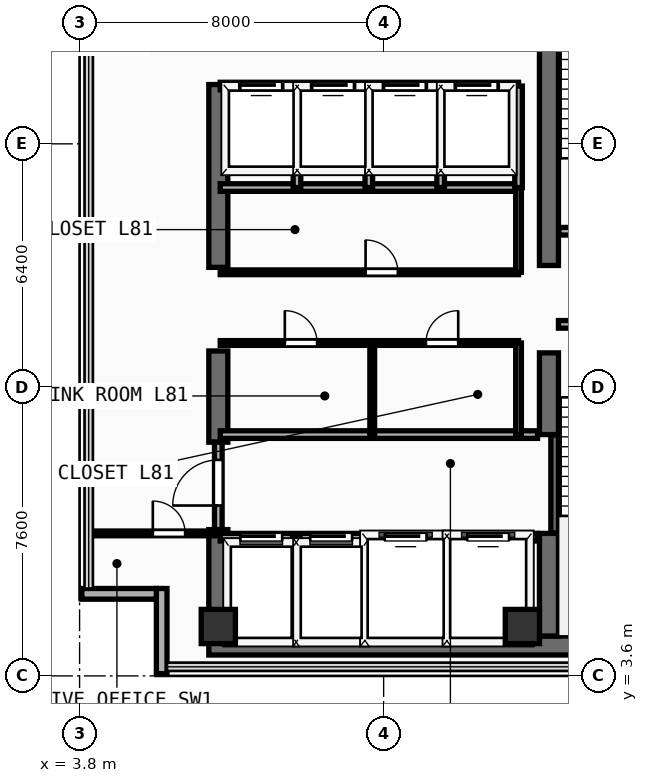
"""IFC4 building model, lengths in metres.
Left out: names, types, materials, properties, quantities, classifications, styles, units other than length and angle.
Written with IfcOpenShell. Run it as: python <this file> out.ifc"""

import sys

from ifc_helpers import new_model, si_unit, direction, frame, frame_2d, origin, origin_2d, place, context, subcontext, project, spatial, rectangle, extrude, element, fill, save


model = new_model("IFC4")
c1 = context("Model", 3, precision=1e-05, world=origin(), true_north=direction((0.0, 1.0)))
c2 = subcontext(c1, "Body", "Model", "MODEL_VIEW")
j1 = project(units=[si_unit("LENGTHUNIT", "METRE"), si_unit("PLANEANGLEUNIT", "RADIAN")], contexts=[c1])
p1 = place(None, origin())
s1 = spatial("IfcSite", under=j1, at=p1, CompositionType="ELEMENT")
p2 = place(p1, origin())
s2 = spatial("IfcBuilding", under=s1, at=p2, CompositionType="ELEMENT")
p3 = place(p2, frame((0.0, 0.0, 316.0)))
s3 = spatial("IfcBuildingStorey", under=s2, at=p3, CompositionType="ELEMENT", Elevation=316.0)
p4 = place(p3, frame((7.2, 4.4, 0.0), z_axis=(0.0, 0.0, 1.0), x_axis=(1.0, 0.0, 0.0)))
e1 = element("IfcWall", 1, at=p4, inside=s3, PredefinedType="SHEAR", context=c2, shape_type="SweptSolid", body=[
    extrude(rectangle(XDim=13.85, YDim=0.5, at=frame_2d((6.925, 0.0))), origin(), (0.0, 0.0, 1.0), 3.56),
])
p5 = place(p3, frame((7.45, 4.65, 0.0), z_axis=(0.0, 0.0, 1.0), x_axis=(0.0, 1.0, 0.0)))
e2 = element("IfcWall", 2, at=p5, inside=s3, PredefinedType="SHEAR", context=c2, shape_type="SweptSolid", body=[
    extrude(rectangle(XDim=2.8, YDim=0.5, at=frame_2d((1.4, 0.0))), origin(), (0.0, 0.0, 1.0), 3.56),
])
p6 = place(p3, frame((7.45, 9.75, 0.0), z_axis=(0.0, 0.0, 1.0), x_axis=(0.0, 1.0, 0.0)))
e3 = element("IfcWall", 3, at=p6, inside=s3, PredefinedType="SHEAR", context=c2, shape_type="SweptSolid", body=[
    extrude(rectangle(XDim=2.4, YDim=0.5, at=frame_2d((1.2, 0.0))), origin(), (0.0, 0.0, 1.0), 3.56),
])
p7 = place(p3, frame((7.45, 14.35, 0.0), z_axis=(0.0, 0.0, 1.0), x_axis=(0.0, 1.0, 0.0)))
e4 = element("IfcWall", 4, at=p7, inside=s3, PredefinedType="SHEAR", context=c2, shape_type="SweptSolid", body=[
    extrude(rectangle(XDim=4.81, YDim=0.5, at=frame_2d((2.405, 0.0))), origin(), (0.0, 0.0, 1.0), 3.56),
])
p8 = place(p3, frame((16.15, 4.65, 0.0), z_axis=(0.0, 0.0, 1.0), x_axis=(0.0, 1.0, 0.0)))
e5 = element("IfcWall", 5, at=p8, inside=s3, PredefinedType="SHEAR", context=c2, shape_type="SweptSolid", body=[
    extrude(rectangle(XDim=2.7, YDim=0.5, at=frame_2d((1.35, 0.0))), origin(), (0.0, 0.0, 1.0), 3.56),
])
p9 = place(p3, frame((16.15, 9.95, 0.0), z_axis=(0.0, 0.0, 1.0), x_axis=(0.0, 1.0, 0.0)))
e6 = element("IfcWall", 6, at=p9, inside=s3, PredefinedType="SHEAR", context=c2, shape_type="SweptSolid", body=[
    extrude(rectangle(XDim=2.15, YDim=0.5, at=frame_2d((1.075, 0.0))), origin(), (0.0, 0.0, 1.0), 3.56),
])
p10 = place(p3, frame((16.15, 14.4, 0.0), z_axis=(0.0, 0.0, 1.0), x_axis=(0.0, 1.0, 0.0)))
e7 = element("IfcWall", 7, at=p10, inside=s3, PredefinedType="SHEAR", context=c2, shape_type="SweptSolid", body=[
    extrude(rectangle(XDim=9.1, YDim=0.5, at=frame_2d((4.55, 0.0))), origin(), (0.0, 0.0, 1.0), 3.56),
])
for number, where, z_axis, x_axis in (
    (8, (7.45, 4.9, 0.0), (0.0, 0.0, 1.0), (1.0, 0.0, 0.0)),
    (9, (15.45, 4.9, 0.0), (0.0, 0.0, 1.0), (1.0, 0.0, 0.0)),
):
    element("IfcColumn", number, at=place(p3, frame(where, z_axis=z_axis, x_axis=x_axis)), inside=s3, PredefinedType="COLUMN", context=c2, shape_type="SweptSolid", body=[
        extrude(rectangle(XDim=0.9, YDim=0.9, at=origin_2d()), origin(), (0.0, 0.0, 1.0), 3.56),
    ])
p11 = place(p3, frame((5.96, 3.66, 0.0), z_axis=(0.0, 0.0, 1.0), x_axis=(0.0, 1.0, 0.0)))
e10 = element("IfcWall", 10, at=p11, inside=s3, PredefinedType="SOLIDWALL", context=c2, shape_type="SweptSolid", body=[
    extrude(rectangle(XDim=2.24, YDim=0.28, at=frame_2d((1.12, 0.0))), origin(), (0.0, 0.0, 1.0), 3.56),
])
p12 = place(p3, frame((3.86, 5.76, 0.0), z_axis=(0.0, 0.0, 1.0), x_axis=(1.0, 0.0, 0.0)))
e11 = element("IfcWall", 11, at=p12, inside=s3, PredefinedType="SOLIDWALL", context=c2, shape_type="SweptSolid", body=[
    extrude(rectangle(XDim=1.96, YDim=0.28, at=frame_2d((0.98, 0.0))), origin(), (0.0, 0.0, 1.0), 3.56),
])
p13 = place(p3, frame((16.3, 7.36, 0.0), z_axis=(0.0, 0.0, 1.0), x_axis=(0.0, 1.0, 0.0)))
e12 = element("IfcWall", 12, at=p13, inside=s3, PredefinedType="SHEAR", context=c2, shape_type="SweptSolid", body=[
    extrude(rectangle(XDim=2.58, YDim=0.2, at=frame_2d((1.29, 0.0))), origin(), (0.0, 0.0, 1.0), 3.56),
])
p14 = place(p3, frame((16.4, 12.85, 0.0), z_axis=(0.0, 0.0, 1.0), x_axis=(1.0, 0.0, 0.0)))
e13 = element("IfcWall", 13, at=p14, inside=s3, PredefinedType="PARTITIONING", context=c2, shape_type="SweptSolid", body=[
    extrude(rectangle(XDim=3.96, YDim=0.2, at=frame_2d((1.98, 0.0))), origin(), (0.0, 0.0, 1.0), 3.56),
])
p15 = place(p14, frame((1.304, 0.0, 0.0)))
e14 = element("IfcOpeningElement", 14, at=p15, cuts=e13, PredefinedType="OPENING", context=c2, shape_type="SweptSolid", body=[
    extrude(rectangle(XDim=1.1, YDim=2.2, at=frame_2d((0.55, 1.1))), frame((0.0, 0.11, 0.0), z_axis=(0.0, -1.0, 0.0), x_axis=(1.0, 0.0, 0.0)), (0.0, 0.0, 1.0), 0.22),
])
p16 = place(p3, frame((16.41, 15.3, 0.0), z_axis=(0.0, 0.0, 1.0), x_axis=(1.0, 0.0, 0.0)))
e15 = element("IfcWall", 15, at=p16, inside=s3, PredefinedType="PARTITIONING", context=c2, shape_type="SweptSolid", body=[
    extrude(rectangle(XDim=3.95, YDim=0.2, at=frame_2d((1.975, 0.0))), origin(), (0.0, 0.0, 1.0), 3.56),
])
p17 = place(p16, frame((1.294, 0.0, 0.0)))
e16 = element("IfcOpeningElement", 16, at=p17, cuts=e15, PredefinedType="OPENING", context=c2, shape_type="SweptSolid", body=[
    extrude(rectangle(XDim=1.1, YDim=2.2, at=frame_2d((0.55, 1.1))), frame((0.0, 0.11, 0.0), z_axis=(0.0, -1.0, 0.0), x_axis=(1.0, 0.0, 0.0)), (0.0, 0.0, 1.0), 0.22),
])
p18 = place(p3, frame((7.5, 7.25, 0.0), z_axis=(0.0, 0.0, 1.0), x_axis=(1.0, 0.0, 0.0)))
e17 = element("IfcWall", 17, at=p18, inside=s3, PredefinedType="PARTITIONING", context=c2, shape_type="SweptSolid", body=[
    extrude(rectangle(XDim=8.35, YDim=0.2, at=frame_2d((4.175, 0.0))), origin(), (0.0, 0.0, 1.0), 3.56),
])
p19 = place(p18, frame((0.53, 0.0, 0.0)))
e18 = element("IfcOpeningElement", 18, at=p19, cuts=e17, PredefinedType="OPENING", context=c2, shape_type="SweptSolid", body=[
    extrude(rectangle(XDim=1.1, YDim=2.2, at=frame_2d((0.55, 1.1))), frame((0.0, 0.11, 0.0), z_axis=(0.0, -1.0, 0.0), x_axis=(1.0, 0.0, 0.0)), (0.0, 0.0, 1.0), 0.22),
])
p20 = place(p18, frame((2.37, 0.0, 0.0)))
e19 = element("IfcOpeningElement", 19, at=p20, cuts=e17, PredefinedType="OPENING", context=c2, shape_type="SweptSolid", body=[
    extrude(rectangle(XDim=1.1, YDim=2.2, at=frame_2d((0.55, 1.1))), frame((0.0, 0.11, 0.0), z_axis=(0.0, -1.0, 0.0), x_axis=(1.0, 0.0, 0.0)), (0.0, 0.0, 1.0), 0.22),
])
p21 = place(p18, frame((4.33, 0.0, 0.0)))
e20 = element("IfcOpeningElement", 20, at=p21, cuts=e17, PredefinedType="OPENING", context=c2, shape_type="SweptSolid", body=[
    extrude(rectangle(XDim=1.1, YDim=2.2, at=frame_2d((0.55, 1.1))), frame((0.0, 0.11, 0.0), z_axis=(0.0, -1.0, 0.0), x_axis=(1.0, 0.0, 0.0)), (0.0, 0.0, 1.0), 0.22),
])
p22 = place(p18, frame((6.5, 0.0, 0.0)))
e21 = element("IfcOpeningElement", 21, at=p22, cuts=e17, PredefinedType="OPENING", context=c2, shape_type="SweptSolid", body=[
    extrude(rectangle(XDim=1.1, YDim=2.2, at=frame_2d((0.55, 1.1))), frame((0.0, 0.11, 0.0), z_axis=(0.0, -1.0, 0.0), x_axis=(1.0, 0.0, 0.0)), (0.0, 0.0, 1.0), 0.22),
])
p23 = place(p3, frame((7.5, 9.95, 0.0), z_axis=(0.0, 0.0, 1.0), x_axis=(1.0, 0.0, 0.0)))
e22 = element("IfcWall", 22, at=p23, inside=s3, PredefinedType="PARTITIONING", context=c2, shape_type="SweptSolid", body=[
    extrude(rectangle(XDim=8.35, YDim=0.2, at=frame_2d((4.175, 0.0))), origin(), (0.0, 0.0, 1.0), 3.56),
])
for number, where, z_axis, x_axis in (
    (23, (9.5, 4.45, 0.0), (0.0, 0.0, 1.0), (0.0, 1.0, 0.0)),
    (24, (11.36, 4.45, 0.0), (0.0, 0.0, 1.0), (0.0, 1.0, 0.0)),
    (25, (13.46, 4.45, 0.0), (0.0, 0.0, 1.0), (0.0, 1.0, 0.0)),
):
    element("IfcWall", number, at=place(p3, frame(where, z_axis=z_axis, x_axis=x_axis)), inside=s3, PredefinedType="PARTITIONING", context=c2, shape_type="SweptSolid", body=[
        extrude(rectangle(XDim=2.8, YDim=0.2, at=frame_2d((1.4, 0.0))), origin(), (0.0, 0.0, 1.0), 3.56),
    ])
p24 = place(p3, frame((7.45, 7.45, 0.0), z_axis=(0.0, 0.0, 1.0), x_axis=(0.0, 1.0, 0.0)))
e26 = element("IfcWall", 26, at=p24, inside=s3, PredefinedType="PARTITIONING", context=c2, shape_type="SweptSolid", body=[
    extrude(rectangle(XDim=2.3, YDim=0.2, at=frame_2d((1.15, 0.0))), origin(), (0.0, 0.0, 1.0), 2.54),
])
p25 = place(p24, frame((0.633, 0.0, 0.0)))
e27 = element("IfcOpeningElement", 27, at=p25, cuts=e26, PredefinedType="OPENING", context=c2, shape_type="SweptSolid", body=[
    extrude(rectangle(XDim=1.2, YDim=2.25, at=frame_2d((0.6, 1.125))), frame((0.0, 0.11, 0.0), z_axis=(0.0, -1.0, 0.0), x_axis=(1.0, 0.0, 0.0)), (0.0, 0.0, 1.0), 0.22),
])
p26 = place(p3, frame((7.5, 16.45, 0.0), z_axis=(0.0, 0.0, 1.0), x_axis=(1.0, 0.0, 0.0)))
e28 = element("IfcWall", 28, at=p26, inside=s3, PredefinedType="PARTITIONING", context=c2, shape_type="SweptSolid", body=[
    extrude(rectangle(XDim=7.85, YDim=0.2, at=frame_2d((3.925, 0.0))), origin(), (0.0, 0.0, 1.0), 3.56),
])
p27 = place(p3, frame((7.5, 12.36, 0.0), z_axis=(0.0, 0.0, 1.0), x_axis=(1.0, 0.0, 0.0)))
e29 = element("IfcWall", 29, at=p27, inside=s3, PredefinedType="PARTITIONING", context=c2, shape_type="SweptSolid", body=[
    extrude(rectangle(XDim=7.85, YDim=0.125, at=frame_2d((3.925, 0.0))), origin(), (0.0, 0.0, 1.0), 3.56),
])
p28 = place(p27, frame((1.7, 0.0, 0.0)))
e30 = element("IfcOpeningElement", 30, at=p28, cuts=e29, PredefinedType="OPENING", context=c2, shape_type="SweptSolid", body=[
    extrude(rectangle(XDim=0.85, YDim=2.15, at=frame_2d((0.425, 1.075))), frame((0.0, 0.073, 0.0), z_axis=(0.0, -1.0, 0.0), x_axis=(1.0, 0.0, 0.0)), (0.0, 0.0, 1.0), 0.145),
])
p29 = place(p27, frame((5.413, 0.0, 0.0)))
e31 = element("IfcOpeningElement", 31, at=p29, cuts=e29, PredefinedType="OPENING", context=c2, shape_type="SweptSolid", body=[
    extrude(rectangle(XDim=0.85, YDim=2.15, at=frame_2d((0.425, 1.075))), frame((0.0, 0.073, 0.0), z_axis=(0.0, -1.0, 0.0), x_axis=(1.0, 0.0, 0.0)), (0.0, 0.0, 1.0), 0.145),
])
p30 = place(p3, frame((7.5, 14.22, 0.0), z_axis=(0.0, 0.0, 1.0), x_axis=(1.0, 0.0, 0.0)))
e32 = element("IfcWall", 32, at=p30, inside=s3, PredefinedType="PARTITIONING", context=c2, shape_type="SweptSolid", body=[
    extrude(rectangle(XDim=7.85, YDim=0.125, at=frame_2d((3.925, 0.0))), origin(), (0.0, 0.0, 1.0), 3.56),
])
p31 = place(p30, frame((3.825, 0.0, 0.0)))
e33 = element("IfcOpeningElement", 33, at=p31, cuts=e32, PredefinedType="OPENING", context=c2, shape_type="SweptSolid", body=[
    extrude(rectangle(XDim=0.85, YDim=2.15, at=frame_2d((0.425, 1.075))), frame((0.0, 0.073, 0.0), z_axis=(0.0, -1.0, 0.0), x_axis=(1.0, 0.0, 0.0)), (0.0, 0.0, 1.0), 0.145),
])
p32 = place(p3, frame((15.35, 9.95, 0.0), z_axis=(0.0, 0.0, 1.0), x_axis=(0.0, 1.0, 0.0)))
e34 = element("IfcWall", 34, at=p32, inside=s3, PredefinedType="PARTITIONING", context=c2, shape_type="SweptSolid", body=[
    extrude(rectangle(XDim=2.41, YDim=0.15, at=frame_2d((1.205, 0.0))), origin(), (0.0, 0.0, 1.0), 3.56),
])
p33 = place(p3, frame((15.35, 14.22, 0.0), z_axis=(0.0, 0.0, 1.0), x_axis=(0.0, 1.0, 0.0)))
e35 = element("IfcWall", 35, at=p33, inside=s3, PredefinedType="PARTITIONING", context=c2, shape_type="SweptSolid", body=[
    extrude(rectangle(XDim=2.23, YDim=0.15, at=frame_2d((1.115, 0.0))), origin(), (0.0, 0.0, 1.0), 3.56),
])
p34 = place(p3, frame((11.5, 9.95, 0.0), z_axis=(0.0, 0.0, 1.0), x_axis=(0.0, 1.0, 0.0)))
e36 = element("IfcWall", 36, at=p34, inside=s3, PredefinedType="PARTITIONING", context=c2, shape_type="SweptSolid", body=[
    extrude(rectangle(XDim=2.41, YDim=0.125, at=frame_2d((1.205, 0.0))), origin(), (0.0, 0.0, 1.0), 3.56),
])
p35 = place(p3, frame((7.5, 19.12, 0.0), z_axis=(0.0, 0.0, 1.0), x_axis=(1.0, 0.0, 0.0)))
e37 = element("IfcWall", 37, at=p35, inside=s3, PredefinedType="PARTITIONING", context=c2, shape_type="SweptSolid", body=[
    extrude(rectangle(XDim=7.85, YDim=0.2, at=frame_2d((3.925, 0.0))), origin(), (0.0, 0.0, 1.0), 3.56),
])
p36 = place(p35, frame((0.53, 0.0, 0.0)))
e38 = element("IfcOpeningElement", 38, at=p36, cuts=e37, PredefinedType="OPENING", context=c2, shape_type="SweptSolid", body=[
    extrude(rectangle(XDim=1.1, YDim=2.2, at=frame_2d((0.55, 1.1))), frame((0.0, 0.11, 0.0), z_axis=(0.0, -1.0, 0.0), x_axis=(1.0, 0.0, 0.0)), (0.0, 0.0, 1.0), 0.22),
])
p37 = place(p35, frame((2.42, 0.0, 0.0)))
e39 = element("IfcOpeningElement", 39, at=p37, cuts=e37, PredefinedType="OPENING", context=c2, shape_type="SweptSolid", body=[
    extrude(rectangle(XDim=1.1, YDim=2.2, at=frame_2d((0.55, 1.1))), frame((0.0, 0.11, 0.0), z_axis=(0.0, -1.0, 0.0), x_axis=(1.0, 0.0, 0.0)), (0.0, 0.0, 1.0), 0.22),
])
p38 = place(p35, frame((4.31, 0.0, 0.0)))
e40 = element("IfcOpeningElement", 40, at=p38, cuts=e37, PredefinedType="OPENING", context=c2, shape_type="SweptSolid", body=[
    extrude(rectangle(XDim=1.1, YDim=2.2, at=frame_2d((0.55, 1.1))), frame((0.0, 0.11, 0.0), z_axis=(0.0, -1.0, 0.0), x_axis=(1.0, 0.0, 0.0)), (0.0, 0.0, 1.0), 0.22),
])
p39 = place(p35, frame((6.2, 0.0, 0.0)))
e41 = element("IfcOpeningElement", 41, at=p39, cuts=e37, PredefinedType="OPENING", context=c2, shape_type="SweptSolid", body=[
    extrude(rectangle(XDim=1.1, YDim=2.2, at=frame_2d((0.55, 1.1))), frame((0.0, 0.11, 0.0), z_axis=(0.0, -1.0, 0.0), x_axis=(1.0, 0.0, 0.0)), (0.0, 0.0, 1.0), 0.22),
])
for number, where, z_axis, x_axis in (
    (42, (15.35, 16.45, 0.0), (0.0, 0.0, 1.0), (0.0, 1.0, 0.0)),
    (43, (9.52, 16.45, 0.0), (0.0, 0.0, 1.0), (0.0, 1.0, 0.0)),
    (44, (11.41, 16.45, 0.0), (0.0, 0.0, 1.0), (0.0, 1.0, 0.0)),
    (45, (13.3, 16.45, 0.0), (0.0, 0.0, 1.0), (0.0, 1.0, 0.0)),
):
    element("IfcWall", number, at=place(p3, frame(where, z_axis=z_axis, x_axis=x_axis)), inside=s3, PredefinedType="PARTITIONING", context=c2, shape_type="SweptSolid", body=[
        extrude(rectangle(XDim=2.67, YDim=0.2, at=frame_2d((1.335, 0.0))), origin(), (0.0, 0.0, 1.0), 3.56),
    ])
p40 = place(p3, frame((4.04, 7.35, 0.0), z_axis=(0.0, 0.0, 1.0), x_axis=(1.0, 0.0, 0.0)))
e46 = element("IfcWall", 46, at=p40, inside=s3, PredefinedType="PARTITIONING", context=c2, shape_type="SweptSolid", body=[
    extrude(rectangle(XDim=3.36, YDim=0.125, at=frame_2d((1.68, 0.0))), origin(), (0.0, 0.0, 1.0), 3.56),
])
p41 = place(p40, frame((1.687, 0.0, 0.0)))
e47 = element("IfcOpeningElement", 47, at=p41, cuts=e46, PredefinedType="OPENING", context=c2, shape_type="SweptSolid", body=[
    extrude(rectangle(XDim=0.85, YDim=2.15, at=frame_2d((0.425, 1.075))), frame((0.0, 0.073, 0.0), z_axis=(0.0, -1.0, 0.0), x_axis=(1.0, 0.0, 0.0)), (0.0, 0.0, 1.0), 0.145),
])
p42 = place(p19, origin())
e48 = element("IfcDoor", 48, at=p42, inside=s3, OperationType="SLIDING_TO_LEFT", PredefinedType="DOOR", context=c2, shape_type="SweptSolid", body=[
    extrude(rectangle(XDim=1.1, YDim=2.2, at=frame_2d((0.55, 1.1))), frame((0.0, 0.025, 0.0), z_axis=(0.0, -1.0, 0.0), x_axis=(1.0, 0.0, 0.0)), (0.0, 0.0, 1.0), 0.05),
])
fill(e18, e48)
p43 = place(p20, origin())
e49 = element("IfcDoor", 49, at=p43, inside=s3, OperationType="SLIDING_TO_LEFT", PredefinedType="DOOR", context=c2, shape_type="SweptSolid", body=[
    extrude(rectangle(XDim=1.1, YDim=2.2, at=frame_2d((0.55, 1.1))), frame((0.0, 0.025, 0.0), z_axis=(0.0, -1.0, 0.0), x_axis=(1.0, 0.0, 0.0)), (0.0, 0.0, 1.0), 0.05),
])
fill(e19, e49)
p44 = place(p21, origin())
e50 = element("IfcDoor", 50, at=p44, inside=s3, OperationType="SLIDING_TO_LEFT", PredefinedType="DOOR", context=c2, shape_type="SweptSolid", body=[
    extrude(rectangle(XDim=1.1, YDim=2.2, at=frame_2d((0.55, 1.1))), frame((0.0, 0.025, 0.0), z_axis=(0.0, -1.0, 0.0), x_axis=(1.0, 0.0, 0.0)), (0.0, 0.0, 1.0), 0.05),
])
fill(e20, e50)
p45 = place(p22, origin())
e51 = element("IfcDoor", 51, at=p45, inside=s3, OperationType="SLIDING_TO_LEFT", PredefinedType="DOOR", context=c2, shape_type="SweptSolid", body=[
    extrude(rectangle(XDim=1.1, YDim=2.2, at=frame_2d((0.55, 1.1))), frame((0.0, 0.025, 0.0), z_axis=(0.0, -1.0, 0.0), x_axis=(1.0, 0.0, 0.0)), (0.0, 0.0, 1.0), 0.05),
])
fill(e21, e51)
p46 = place(p25, frame((1.2, 0.0, 0.0), z_axis=(0.0, 0.0, 1.0), x_axis=(-1.0, 0.0, 0.0)))
e52 = element("IfcDoor", 52, at=p46, inside=s3, OperationType="SINGLE_SWING_RIGHT", PredefinedType="DOOR", context=c2, shape_type="SweptSolid", body=[
    extrude(rectangle(XDim=1.2, YDim=2.25, at=frame_2d((0.6, 1.125))), frame((0.0, 0.025, 0.0), z_axis=(0.0, -1.0, 0.0), x_axis=(1.0, 0.0, 0.0)), (0.0, 0.0, 1.0), 0.05),
])
fill(e27, e52)
p47 = place(p28, origin())
e53 = element("IfcDoor", 53, at=p47, inside=s3, OperationType="SINGLE_SWING_LEFT", PredefinedType="DOOR", context=c2, shape_type="SweptSolid", body=[
    extrude(rectangle(XDim=0.85, YDim=2.15, at=frame_2d((0.425, 1.075))), frame((0.0, 0.025, 0.0), z_axis=(0.0, -1.0, 0.0), x_axis=(1.0, 0.0, 0.0)), (0.0, 0.0, 1.0), 0.05),
])
fill(e30, e53)
p48 = place(p29, origin())
e54 = element("IfcDoor", 54, at=p48, inside=s3, OperationType="SINGLE_SWING_RIGHT", PredefinedType="DOOR", context=c2, shape_type="SweptSolid", body=[
    extrude(rectangle(XDim=0.85, YDim=2.15, at=frame_2d((0.425, 1.075))), frame((0.0, 0.025, 0.0), z_axis=(0.0, -1.0, 0.0), x_axis=(1.0, 0.0, 0.0)), (0.0, 0.0, 1.0), 0.05),
])
fill(e31, e54)
p49 = place(p31, origin())
e55 = element("IfcDoor", 55, at=p49, inside=s3, OperationType="SINGLE_SWING_LEFT", PredefinedType="DOOR", context=c2, shape_type="SweptSolid", body=[
    extrude(rectangle(XDim=0.85, YDim=2.15, at=frame_2d((0.425, 1.075))), frame((0.0, 0.025, 0.0), z_axis=(0.0, -1.0, 0.0), x_axis=(1.0, 0.0, 0.0)), (0.0, 0.0, 1.0), 0.05),
])
fill(e33, e55)
p50 = place(p36, origin())
e56 = element("IfcDoor", 56, at=p50, inside=s3, OperationType="SLIDING_TO_LEFT", PredefinedType="DOOR", context=c2, shape_type="SweptSolid", body=[
    extrude(rectangle(XDim=1.1, YDim=2.2, at=frame_2d((0.55, 1.1))), frame((0.0, 0.025, 0.0), z_axis=(0.0, -1.0, 0.0), x_axis=(1.0, 0.0, 0.0)), (0.0, 0.0, 1.0), 0.05),
])
fill(e38, e56)
p51 = place(p37, origin())
e57 = element("IfcDoor", 57, at=p51, inside=s3, OperationType="SLIDING_TO_LEFT", PredefinedType="DOOR", context=c2, shape_type="SweptSolid", body=[
    extrude(rectangle(XDim=1.1, YDim=2.2, at=frame_2d((0.55, 1.1))), frame((0.0, 0.025, 0.0), z_axis=(0.0, -1.0, 0.0), x_axis=(1.0, 0.0, 0.0)), (0.0, 0.0, 1.0), 0.05),
])
fill(e39, e57)
p52 = place(p38, origin())
e58 = element("IfcDoor", 58, at=p52, inside=s3, OperationType="SLIDING_TO_LEFT", PredefinedType="DOOR", context=c2, shape_type="SweptSolid", body=[
    extrude(rectangle(XDim=1.1, YDim=2.2, at=frame_2d((0.55, 1.1))), frame((0.0, 0.025, 0.0), z_axis=(0.0, -1.0, 0.0), x_axis=(1.0, 0.0, 0.0)), (0.0, 0.0, 1.0), 0.05),
])
fill(e40, e58)
p53 = place(p39, origin())
e59 = element("IfcDoor", 59, at=p53, inside=s3, OperationType="SLIDING_TO_LEFT", PredefinedType="DOOR", context=c2, shape_type="SweptSolid", body=[
    extrude(rectangle(XDim=1.1, YDim=2.2, at=frame_2d((0.55, 1.1))), frame((0.0, 0.025, 0.0), z_axis=(0.0, -1.0, 0.0), x_axis=(1.0, 0.0, 0.0)), (0.0, 0.0, 1.0), 0.05),
])
fill(e41, e59)
p54 = place(p41, origin())
e60 = element("IfcDoor", 60, at=p54, inside=s3, OperationType="SINGLE_SWING_LEFT", PredefinedType="DOOR", context=c2, shape_type="SweptSolid", body=[
    extrude(rectangle(XDim=0.85, YDim=2.15, at=frame_2d((0.425, 1.075))), frame((0.0, 0.025, 0.0), z_axis=(0.0, -1.0, 0.0), x_axis=(1.0, 0.0, 0.0)), (0.0, 0.0, 1.0), 0.05),
])
fill(e47, e60)
save(model, sys.argv[1])
